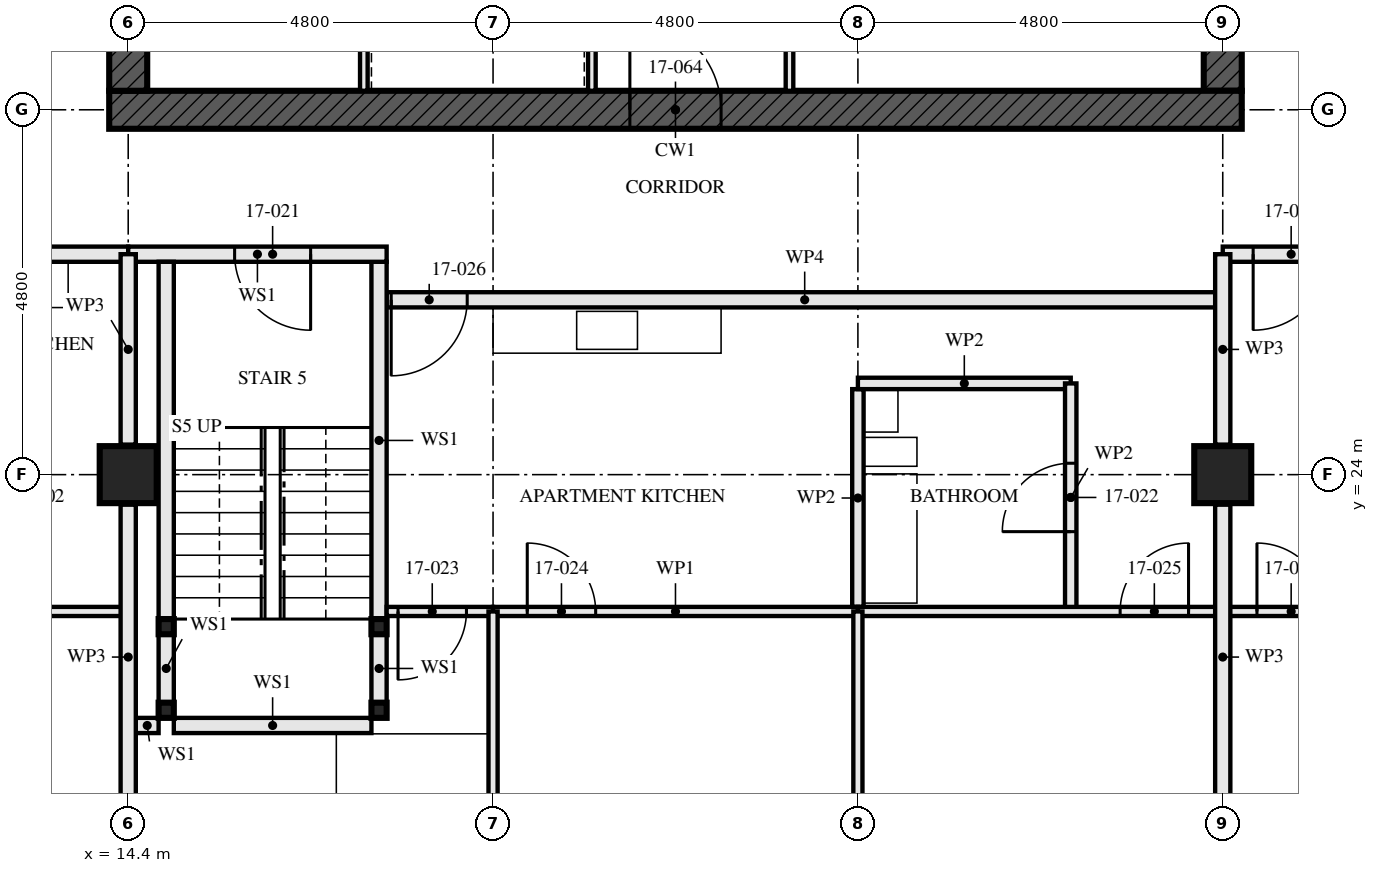
"""IFC4 building model, lengths in metres.
Left out: names, types, materials, properties, quantities, classifications, styles, units other than length and angle.
Written with IfcOpenShell. Run it as: python <this file> out.ifc"""

import sys

from ifc_helpers import new_model, si_unit, direction, frame, frame_2d, origin, origin_2d, place, context, subcontext, project, spatial, rectangle, hollow_rectangle, extrude, element, fill, save


model = new_model("IFC4")
c1 = context("Model", 3, precision=1e-05, world=origin(), true_north=direction((0.0, 1.0)))
c2 = subcontext(c1, "Body", "Model", "MODEL_VIEW")
j1 = project(units=[si_unit("LENGTHUNIT", "METRE"), si_unit("PLANEANGLEUNIT", "RADIAN")], contexts=[c1])
p1 = place(None, origin())
s1 = spatial("IfcSite", under=j1, at=p1, CompositionType="ELEMENT")
p2 = place(p1, origin())
s2 = spatial("IfcBuilding", under=s1, at=p2, CompositionType="ELEMENT")
p3 = place(p2, frame((0.0, 0.0, 65.5)))
s3 = spatial("IfcBuildingStorey", under=s2, at=p3, CompositionType="ELEMENT", Elevation=65.5)
for number, where, z_axis, x_axis in (
    (1, (14.4, 24.0, 0.0), (0.0, 0.0, 1.0), (1.0, 0.0, 0.0)),
    (2, (28.8, 24.0, 0.0), (0.0, 0.0, 1.0), (1.0, 0.0, 0.0)),
):
    element("IfcColumn", number, at=place(p3, frame(where, z_axis=z_axis, x_axis=x_axis)), inside=s3, PredefinedType="COLUMN", context=c2, shape_type="SweptSolid", body=[
        extrude(hollow_rectangle(XDim=0.75, YDim=0.75, WallThickness=0.08, at=origin_2d()), origin(), (0.0, 0.0, 1.0), 3.5),
    ])
p4 = place(p3, frame((14.15, 28.8, -0.17), z_axis=(0.0, 0.0, 1.0), x_axis=(1.0, 0.0, 0.0)))
e3 = element("IfcWall", 3, at=p4, inside=s3, PredefinedType="SHEAR", context=c2, shape_type="SweptSolid", body=[
    extrude(rectangle(XDim=14.9, YDim=0.5, at=frame_2d((7.45, 0.0))), origin(), (0.0, 0.0, 1.0), 3.5),
])
p5 = place(p4, frame((6.85, 0.0, 0.17)))
e4 = element("IfcOpeningElement", 4, at=p5, cuts=e3, PredefinedType="OPENING", context=c2, shape_type="SweptSolid", body=[
    extrude(rectangle(XDim=1.2, YDim=2.1, at=frame_2d((0.6, 1.05))), frame((0.0, 0.26, 0.0), z_axis=(0.0, -1.0, 0.0), x_axis=(1.0, 0.0, 0.0)), (0.0, 0.0, 1.0), 0.521),
])
p6 = place(p3, frame((14.4, 42.95, -0.17), z_axis=(0.0, 0.0, 1.0), x_axis=(0.0, -1.0, 0.0)))
e5 = element("IfcWall", 5, at=p6, inside=s3, PredefinedType="SHEAR", context=c2, shape_type="SweptSolid", body=[
    extrude(rectangle(XDim=13.9, YDim=0.5, at=frame_2d((6.95, 0.0))), origin(), (0.0, 0.0, 1.0), 3.5),
])
p7 = place(p6, frame((6.35, 0.0, 0.17)))
e6 = element("IfcOpeningElement", 6, at=p7, cuts=e5, PredefinedType="OPENING", context=c2, shape_type="SweptSolid", body=[
    extrude(rectangle(XDim=1.2, YDim=2.1, at=frame_2d((0.6, 1.05))), frame((0.0, 0.26, 0.0), z_axis=(0.0, -1.0, 0.0), x_axis=(1.0, 0.0, 0.0)), (0.0, 0.0, 1.0), 0.521),
])
p8 = place(p3, frame((28.8, 29.05, -0.17), z_axis=(0.0, 0.0, 1.0), x_axis=(0.0, 1.0, 0.0)))
e7 = element("IfcWall", 7, at=p8, inside=s3, PredefinedType="SHEAR", context=c2, shape_type="SweptSolid", body=[
    extrude(rectangle(XDim=13.9, YDim=0.5, at=frame_2d((6.95, 0.0))), origin(), (0.0, 0.0, 1.0), 3.5),
])
p9 = place(p8, frame((6.35, 0.0, 0.17)))
e8 = element("IfcOpeningElement", 8, at=p9, cuts=e7, PredefinedType="OPENING", context=c2, shape_type="SweptSolid", body=[
    extrude(rectangle(XDim=1.2, YDim=2.1, at=frame_2d((0.6, 1.05))), frame((0.0, 0.26, 0.0), z_axis=(0.0, -1.0, 0.0), x_axis=(1.0, 0.0, 0.0)), (0.0, 0.0, 1.0), 0.521),
])
for number, where, z_axis, x_axis in (
    (9, (14.9, 20.9, 0.0), (0.0, 0.0, 1.0), (1.0, 0.0, 0.0)),
    (10, (17.7, 20.9, 0.0), (0.0, 0.0, 1.0), (1.0, 0.0, 0.0)),
    (11, (14.9, 22.0, 0.0), (0.0, 0.0, 1.0), (1.0, 0.0, 0.0)),
    (12, (17.7, 22.0, 0.0), (0.0, 0.0, 1.0), (1.0, 0.0, 0.0)),
):
    element("IfcColumn", number, at=place(p3, frame(where, z_axis=z_axis, x_axis=x_axis)), inside=s3, PredefinedType="COLUMN", context=c2, shape_type="SweptSolid", body=[
        extrude(hollow_rectangle(XDim=0.2, YDim=0.2, WallThickness=0.008, at=origin_2d()), origin(), (0.0, 0.0, 1.0), 3.33),
    ])
p10 = place(p3, frame((9.6, 22.2, 0.0), z_axis=(0.0, 0.0, 1.0), x_axis=(1.0, 0.0, 0.0)))
e13 = element("IfcWall", 13, at=p10, inside=s3, PredefinedType="PARTITIONING", context=c2, shape_type="SweptSolid", body=[
    extrude(rectangle(XDim=4.8, YDim=0.12, at=frame_2d((2.4, 0.0))), origin(), (0.0, 0.0, 1.0), 3.33),
])
p11 = place(p3, frame((4.8, 26.9, 0.0), z_axis=(0.0, 0.0, 1.0), x_axis=(1.0, 0.0, 0.0)))
e14 = element("IfcWall", 14, at=p11, inside=s3, PredefinedType="PARTITIONING", context=c2, shape_type="SweptSolid", body=[
    extrude(rectangle(XDim=9.6, YDim=0.2, at=frame_2d((4.8, 0.0))), origin(), (0.0, 0.0, 1.0), 3.33),
])
p12 = place(p11, frame((0.4, 0.0, 0.0)))
e15 = element("IfcOpeningElement", 15, at=p12, cuts=e14, PredefinedType="OPENING", context=c2, shape_type="SweptSolid", body=[
    extrude(rectangle(XDim=1.0, YDim=2.1, at=frame_2d((0.5, 1.05))), frame((0.0, 0.111, 0.0), z_axis=(0.0, -1.0, 0.0), x_axis=(1.0, 0.0, 0.0)), (0.0, 0.0, 1.0), 0.221),
])
p13 = place(p3, frame((14.9, 21.0, 0.0), z_axis=(0.0, 0.0, 1.0), x_axis=(0.0, 1.0, 0.0)))
e16 = element("IfcWall", 16, at=p13, inside=s3, PredefinedType="SOLIDWALL", context=c2, shape_type="SweptSolid", body=[
    extrude(rectangle(XDim=0.9, YDim=0.2, at=frame_2d((0.45, 0.0))), origin(), (0.0, 0.0, 1.0), 2.99),
])
p14 = place(p3, frame((14.9, 22.1, 0.0), z_axis=(0.0, 0.0, 1.0), x_axis=(0.0, 1.0, 0.0)))
e17 = element("IfcWall", 17, at=p14, inside=s3, PredefinedType="SOLIDWALL", context=c2, shape_type="SweptSolid", body=[
    extrude(rectangle(XDim=4.7, YDim=0.2, at=frame_2d((2.35, 0.0))), origin(), (0.0, 0.0, 1.0), 2.99),
])
p15 = place(p3, frame((17.7, 21.0, 0.0), z_axis=(0.0, 0.0, 1.0), x_axis=(0.0, 1.0, 0.0)))
e18 = element("IfcWall", 18, at=p15, inside=s3, PredefinedType="SOLIDWALL", context=c2, shape_type="SweptSolid", body=[
    extrude(rectangle(XDim=0.9, YDim=0.2, at=frame_2d((0.45, 0.0))), origin(), (0.0, 0.0, 1.0), 2.99),
])
p16 = place(p3, frame((17.7, 22.1, 0.0), z_axis=(0.0, 0.0, 1.0), x_axis=(0.0, 1.0, 0.0)))
e19 = element("IfcWall", 19, at=p16, inside=s3, PredefinedType="SOLIDWALL", context=c2, shape_type="SweptSolid", body=[
    extrude(rectangle(XDim=4.7, YDim=0.2, at=frame_2d((2.35, 0.0))), origin(), (0.0, 0.0, 1.0), 2.99),
])
p17 = place(p3, frame((14.5, 20.7, 0.0), z_axis=(0.0, 0.0, 1.0), x_axis=(1.0, 0.0, 0.0)))
e20 = element("IfcWall", 20, at=p17, inside=s3, PredefinedType="SOLIDWALL", context=c2, shape_type="SweptSolid", body=[
    extrude(rectangle(XDim=0.3, YDim=0.2, at=frame_2d((0.15, 0.0))), origin(), (0.0, 0.0, 1.0), 3.33),
])
p18 = place(p3, frame((15.0, 20.7, 0.0), z_axis=(0.0, 0.0, 1.0), x_axis=(1.0, 0.0, 0.0)))
e21 = element("IfcWall", 21, at=p18, inside=s3, PredefinedType="SOLIDWALL", context=c2, shape_type="SweptSolid", body=[
    extrude(rectangle(XDim=2.6, YDim=0.2, at=frame_2d((1.3, 0.0))), origin(), (0.0, 0.0, 1.0), 3.33),
])
p19 = place(p3, frame((14.4, 26.9, 0.0), z_axis=(0.0, 0.0, 1.0), x_axis=(1.0, 0.0, 0.0)))
e22 = element("IfcWall", 22, at=p19, inside=s3, PredefinedType="SOLIDWALL", context=c2, shape_type="SweptSolid", body=[
    extrude(rectangle(XDim=3.4, YDim=0.2, at=frame_2d((1.7, 0.0))), origin(), (0.0, 0.0, 1.0), 3.33),
])
p20 = place(p19, frame((1.4, 0.0, 0.0)))
e23 = element("IfcOpeningElement", 23, at=p20, cuts=e22, PredefinedType="OPENING", context=c2, shape_type="SweptSolid", body=[
    extrude(rectangle(XDim=1.0, YDim=2.1, at=frame_2d((0.5, 1.05))), frame((0.0, 0.111, 0.0), z_axis=(0.0, -1.0, 0.0), x_axis=(1.0, 0.0, 0.0)), (0.0, 0.0, 1.0), 0.221),
])
p21 = place(p3, frame((26.8, 22.2, 0.0), z_axis=(0.0, 0.0, 1.0), x_axis=(0.0, 1.0, 0.0)))
e24 = element("IfcWall", 24, at=p21, inside=s3, PredefinedType="PARTITIONING", context=c2, shape_type="SweptSolid", body=[
    extrude(rectangle(XDim=3.0, YDim=0.15, at=frame_2d((1.5, 0.0))), origin(), (0.0, 0.0, 1.0), 2.55),
])
p22 = place(p21, frame((1.05, 0.0, 0.0)))
e25 = element("IfcOpeningElement", 25, at=p22, cuts=e24, PredefinedType="OPENING", context=c2, shape_type="SweptSolid", body=[
    extrude(rectangle(XDim=0.9, YDim=2.1, at=frame_2d((0.45, 1.05))), frame((0.0, 0.085, 0.0), z_axis=(0.0, -1.0, 0.0), x_axis=(1.0, 0.0, 0.0)), (0.0, 0.0, 1.0), 0.171),
])
p23 = place(p3, frame((24.0, 25.2, 0.0), z_axis=(0.0, 0.0, 1.0), x_axis=(1.0, 0.0, 0.0)))
e26 = element("IfcWall", 26, at=p23, inside=s3, PredefinedType="PARTITIONING", context=c2, shape_type="SweptSolid", body=[
    extrude(rectangle(XDim=2.8, YDim=0.15, at=frame_2d((1.4, 0.0))), origin(), (0.0, 0.0, 1.0), 3.33),
])
p24 = place(p3, frame((17.8, 22.2, 0.0), z_axis=(0.0, 0.0, 1.0), x_axis=(1.0, 0.0, 0.0)))
e27 = element("IfcWall", 27, at=p24, inside=s3, PredefinedType="PARTITIONING", context=c2, shape_type="SweptSolid", body=[
    extrude(rectangle(XDim=1.4, YDim=0.12, at=frame_2d((0.7, 0.0))), origin(), (0.0, 0.0, 1.0), 3.33),
])
p25 = place(p24, frame((0.15, 0.0, 0.0)))
e28 = element("IfcOpeningElement", 28, at=p25, cuts=e27, PredefinedType="OPENING", context=c2, shape_type="SweptSolid", body=[
    extrude(rectangle(XDim=0.9, YDim=2.1, at=frame_2d((0.45, 1.05))), frame((0.0, 0.071, 0.0), z_axis=(0.0, -1.0, 0.0), x_axis=(1.0, 0.0, 0.0)), (0.0, 0.0, 1.0), 0.141),
])
p26 = place(p3, frame((19.2, 22.2, 0.0), z_axis=(0.0, 0.0, 1.0), x_axis=(1.0, 0.0, 0.0)))
e29 = element("IfcWall", 29, at=p26, inside=s3, PredefinedType="PARTITIONING", context=c2, shape_type="SweptSolid", body=[
    extrude(rectangle(XDim=4.8, YDim=0.12, at=frame_2d((2.4, 0.0))), origin(), (0.0, 0.0, 1.0), 3.33),
])
p27 = place(p26, frame((0.45, 0.0, 0.0)))
e30 = element("IfcOpeningElement", 30, at=p27, cuts=e29, PredefinedType="OPENING", context=c2, shape_type="SweptSolid", body=[
    extrude(rectangle(XDim=0.9, YDim=2.1, at=frame_2d((0.45, 1.05))), frame((0.0, 0.071, 0.0), z_axis=(0.0, -1.0, 0.0), x_axis=(1.0, 0.0, 0.0)), (0.0, 0.0, 1.0), 0.141),
])
p28 = place(p3, frame((24.0, 22.2, 0.0), z_axis=(0.0, 0.0, 1.0), x_axis=(1.0, 0.0, 0.0)))
e31 = element("IfcWall", 31, at=p28, inside=s3, PredefinedType="PARTITIONING", context=c2, shape_type="SweptSolid", body=[
    extrude(rectangle(XDim=4.8, YDim=0.12, at=frame_2d((2.4, 0.0))), origin(), (0.0, 0.0, 1.0), 3.33),
])
p29 = place(p28, frame((3.45, 0.0, 0.0)))
e32 = element("IfcOpeningElement", 32, at=p29, cuts=e31, PredefinedType="OPENING", context=c2, shape_type="SweptSolid", body=[
    extrude(rectangle(XDim=0.9, YDim=2.1, at=frame_2d((0.45, 1.05))), frame((0.0, 0.071, 0.0), z_axis=(0.0, -1.0, 0.0), x_axis=(1.0, 0.0, 0.0)), (0.0, 0.0, 1.0), 0.141),
])
for number, where, z_axis, x_axis in (
    (33, (19.2, 14.72, 0.0), (0.0, 0.0, 1.0), (0.0, 1.0, 0.0)),
    (34, (24.0, 14.72, 0.0), (0.0, 0.0, 1.0), (0.0, 1.0, 0.0)),
):
    element("IfcWall", number, at=place(p3, frame(where, z_axis=z_axis, x_axis=x_axis)), inside=s3, PredefinedType="PARTITIONING", context=c2, shape_type="SweptSolid", body=[
        extrude(rectangle(XDim=7.48, YDim=0.12, at=frame_2d((3.74, 0.0))), origin(), (0.0, 0.0, 1.0), 2.55),
    ])
p30 = place(p3, frame((17.8, 26.3, 0.0), z_axis=(0.0, 0.0, 1.0), x_axis=(1.0, 0.0, 0.0)))
e35 = element("IfcWall", 35, at=p30, inside=s3, PredefinedType="PARTITIONING", context=c2, shape_type="SweptSolid", body=[
    extrude(rectangle(XDim=11.0, YDim=0.2, at=frame_2d((5.5, 0.0))), origin(), (0.0, 0.0, 1.0), 2.55),
])
p31 = place(p30, frame((0.06, 0.0, 0.0)))
e36 = element("IfcOpeningElement", 36, at=p31, cuts=e35, PredefinedType="OPENING", context=c2, shape_type="SweptSolid", body=[
    extrude(rectangle(XDim=1.0, YDim=2.1, at=frame_2d((0.5, 1.05))), frame((0.0, 0.111, 0.0), z_axis=(0.0, -1.0, 0.0), x_axis=(1.0, 0.0, 0.0)), (0.0, 0.0, 1.0), 0.221),
])
p32 = place(p3, frame((28.8, 22.2, 0.0), z_axis=(0.0, 0.0, 1.0), x_axis=(1.0, 0.0, 0.0)))
e37 = element("IfcWall", 37, at=p32, inside=s3, PredefinedType="PARTITIONING", context=c2, shape_type="SweptSolid", body=[
    extrude(rectangle(XDim=4.8, YDim=0.12, at=frame_2d((2.4, 0.0))), origin(), (0.0, 0.0, 1.0), 3.33),
])
p33 = place(p32, frame((0.45, 0.0, 0.0)))
e38 = element("IfcOpeningElement", 38, at=p33, cuts=e37, PredefinedType="OPENING", context=c2, shape_type="SweptSolid", body=[
    extrude(rectangle(XDim=0.9, YDim=2.1, at=frame_2d((0.45, 1.05))), frame((0.0, 0.071, 0.0), z_axis=(0.0, -1.0, 0.0), x_axis=(1.0, 0.0, 0.0)), (0.0, 0.0, 1.0), 0.141),
])
p34 = place(p3, frame((28.8, 26.9, 0.0), z_axis=(0.0, 0.0, 1.0), x_axis=(1.0, 0.0, 0.0)))
e39 = element("IfcWall", 39, at=p34, inside=s3, PredefinedType="PARTITIONING", context=c2, shape_type="SweptSolid", body=[
    extrude(rectangle(XDim=9.6, YDim=0.2, at=frame_2d((4.8, 0.0))), origin(), (0.0, 0.0, 1.0), 3.33),
])
p35 = place(p34, frame((0.4, 0.0, 0.0)))
e40 = element("IfcOpeningElement", 40, at=p35, cuts=e39, PredefinedType="OPENING", context=c2, shape_type="SweptSolid", body=[
    extrude(rectangle(XDim=1.0, YDim=2.1, at=frame_2d((0.5, 1.05))), frame((0.0, 0.111, 0.0), z_axis=(0.0, -1.0, 0.0), x_axis=(1.0, 0.0, 0.0)), (0.0, 0.0, 1.0), 0.221),
])
p36 = place(p3, frame((20.5, 29.05, 0.0), z_axis=(0.0, 0.0, 1.0), x_axis=(0.0, 1.0, 0.0)))
e41 = element("IfcWall", 41, at=p36, inside=s3, PredefinedType="SOLIDWALL", context=c2, shape_type="SweptSolid", body=[
    extrude(rectangle(XDim=5.8, YDim=0.1, at=frame_2d((2.9, 0.0))), origin(), (0.0, 0.0, 1.0), 3.33),
])
p37 = place(p36, frame((0.8, 0.0, 0.0)))
e42 = element("IfcOpeningElement", 42, at=p37, cuts=e41, PredefinedType="OPENING", context=c2, shape_type="SweptSolid", body=[
    extrude(rectangle(XDim=1.1, YDim=2.3, at=frame_2d((0.55, 1.15))), frame((0.0, 0.061, 0.0), z_axis=(0.0, -1.0, 0.0), x_axis=(1.0, 0.0, 0.0)), (0.0, 0.0, 1.0), 0.121),
])
p38 = place(p36, frame((3.775, 0.0, 0.0)))
e43 = element("IfcOpeningElement", 43, at=p38, cuts=e41, PredefinedType="OPENING", context=c2, shape_type="SweptSolid", body=[
    extrude(rectangle(XDim=1.1, YDim=2.3, at=frame_2d((0.55, 1.15))), frame((0.0, 0.061, 0.0), z_axis=(0.0, -1.0, 0.0), x_axis=(1.0, 0.0, 0.0)), (0.0, 0.0, 1.0), 0.121),
])
p39 = place(p3, frame((23.1, 29.05, 0.0), z_axis=(0.0, 0.0, 1.0), x_axis=(0.0, 1.0, 0.0)))
e44 = element("IfcWall", 44, at=p39, inside=s3, PredefinedType="SOLIDWALL", context=c2, shape_type="SweptSolid", body=[
    extrude(rectangle(XDim=5.8, YDim=0.1, at=frame_2d((2.9, 0.0))), origin(), (0.0, 0.0, 1.0), 3.33),
])
p40 = place(p39, frame((1.0, 0.0, 0.0)))
e45 = element("IfcOpeningElement", 45, at=p40, cuts=e44, PredefinedType="OPENING", context=c2, shape_type="SweptSolid", body=[
    extrude(rectangle(XDim=0.7, YDim=2.1, at=frame_2d((0.35, 1.05))), frame((0.0, 0.061, 0.0), z_axis=(0.0, -1.0, 0.0), x_axis=(1.0, 0.0, 0.0)), (0.0, 0.0, 1.0), 0.121),
])
p41 = place(p3, frame((17.5, 29.05, 0.0), z_axis=(0.0, 0.0, 1.0), x_axis=(0.0, 1.0, 0.0)))
e46 = element("IfcWall", 46, at=p41, inside=s3, PredefinedType="SOLIDWALL", context=c2, shape_type="SweptSolid", body=[
    extrude(rectangle(XDim=5.8, YDim=0.1, at=frame_2d((2.9, 0.0))), origin(), (0.0, 0.0, 1.0), 3.33),
])
p42 = place(p3, frame((14.4, 19.595, 0.0), z_axis=(0.0, 0.0, 1.0), x_axis=(0.0, 1.0, 0.0)))
e47 = element("IfcWall", 47, at=p42, inside=s3, PredefinedType="PARTITIONING", context=c2, shape_type="SweptSolid", body=[
    extrude(rectangle(XDim=4.01, YDim=0.2, at=frame_2d((2.005, 0.0))), origin(), (0.0, 0.0, 1.0), 2.32),
])
p43 = place(p3, frame((14.4, 24.395, 0.0), z_axis=(0.0, 0.0, 1.0), x_axis=(0.0, 1.0, 0.0)))
e48 = element("IfcWall", 48, at=p43, inside=s3, PredefinedType="PARTITIONING", context=c2, shape_type="SweptSolid", body=[
    extrude(rectangle(XDim=2.505, YDim=0.2, at=frame_2d((1.252, 0.0))), origin(), (0.0, 0.0, 1.0), 2.32),
])
p44 = place(p3, frame((28.8, 19.595, 0.0), z_axis=(0.0, 0.0, 1.0), x_axis=(0.0, 1.0, 0.0)))
e49 = element("IfcWall", 49, at=p44, inside=s3, PredefinedType="PARTITIONING", context=c2, shape_type="SweptSolid", body=[
    extrude(rectangle(XDim=4.01, YDim=0.2, at=frame_2d((2.005, 0.0))), origin(), (0.0, 0.0, 1.0), 2.32),
])
p45 = place(p3, frame((28.8, 24.395, 0.0), z_axis=(0.0, 0.0, 1.0), x_axis=(0.0, 1.0, 0.0)))
e50 = element("IfcWall", 50, at=p45, inside=s3, PredefinedType="PARTITIONING", context=c2, shape_type="SweptSolid", body=[
    extrude(rectangle(XDim=2.505, YDim=0.2, at=frame_2d((1.252, 0.0))), origin(), (0.0, 0.0, 1.0), 2.32),
])
p46 = place(p3, frame((24.0, 22.26, 0.0), z_axis=(0.0, 0.0, 1.0), x_axis=(0.0, 1.0, 0.0)))
e51 = element("IfcWall", 51, at=p46, inside=s3, PredefinedType="PARTITIONING", context=c2, shape_type="SweptSolid", body=[
    extrude(rectangle(XDim=2.865, YDim=0.15, at=frame_2d((1.433, 0.0))), origin(), (0.0, 0.0, 1.0), 2.55),
])
p47 = place(p20, frame((1.0, 0.0, 0.0), z_axis=(0.0, 0.0, 1.0), x_axis=(-1.0, 0.0, 0.0)))
e52 = element("IfcDoor", 52, at=p47, inside=s3, OperationType="SINGLE_SWING_RIGHT", PredefinedType="DOOR", context=c2, shape_type="SweptSolid", body=[
    extrude(rectangle(XDim=1.0, YDim=2.1, at=frame_2d((0.5, 1.05))), frame((0.0, 0.032, 0.0), z_axis=(0.0, -1.0, 0.0), x_axis=(1.0, 0.0, 0.0)), (0.0, 0.0, 1.0), 0.064),
])
fill(e23, e52)
p48 = place(p22, origin())
e53 = element("IfcDoor", 53, at=p48, inside=s3, OperationType="SINGLE_SWING_RIGHT", PredefinedType="DOOR", context=c2, shape_type="SweptSolid", body=[
    extrude(rectangle(XDim=0.9, YDim=2.1, at=frame_2d((0.45, 1.05))), frame((0.0, 0.022, 0.0), z_axis=(0.0, -1.0, 0.0), x_axis=(1.0, 0.0, 0.0)), (0.0, 0.0, 1.0), 0.044),
])
fill(e25, e53)
p49 = place(p25, frame((0.9, 0.0, 0.0), z_axis=(0.0, 0.0, 1.0), x_axis=(-1.0, 0.0, 0.0)))
e54 = element("IfcDoor", 54, at=p49, inside=s3, OperationType="SINGLE_SWING_LEFT", PredefinedType="DOOR", context=c2, shape_type="SweptSolid", body=[
    extrude(rectangle(XDim=0.9, YDim=2.1, at=frame_2d((0.45, 1.05))), frame((0.0, 0.022, 0.0), z_axis=(0.0, -1.0, 0.0), x_axis=(1.0, 0.0, 0.0)), (0.0, 0.0, 1.0), 0.044),
])
fill(e28, e54)
p50 = place(p27, origin())
e55 = element("IfcDoor", 55, at=p50, inside=s3, OperationType="SINGLE_SWING_RIGHT", PredefinedType="DOOR", context=c2, shape_type="SweptSolid", body=[
    extrude(rectangle(XDim=0.9, YDim=2.1, at=frame_2d((0.45, 1.05))), frame((0.0, 0.022, 0.0), z_axis=(0.0, -1.0, 0.0), x_axis=(1.0, 0.0, 0.0)), (0.0, 0.0, 1.0), 0.044),
])
fill(e30, e55)
p51 = place(p29, origin())
e56 = element("IfcDoor", 56, at=p51, inside=s3, OperationType="SINGLE_SWING_LEFT", PredefinedType="DOOR", context=c2, shape_type="SweptSolid", body=[
    extrude(rectangle(XDim=0.9, YDim=2.1, at=frame_2d((0.45, 1.05))), frame((0.0, 0.022, 0.0), z_axis=(0.0, -1.0, 0.0), x_axis=(1.0, 0.0, 0.0)), (0.0, 0.0, 1.0), 0.044),
])
fill(e32, e56)
p52 = place(p31, frame((1.0, 0.0, 0.0), z_axis=(0.0, 0.0, 1.0), x_axis=(-1.0, 0.0, 0.0)))
e57 = element("IfcDoor", 57, at=p52, inside=s3, OperationType="SINGLE_SWING_LEFT", PredefinedType="DOOR", context=c2, shape_type="SweptSolid", body=[
    extrude(rectangle(XDim=1.0, YDim=2.1, at=frame_2d((0.5, 1.05))), frame((0.0, 0.027, 0.0), z_axis=(0.0, -1.0, 0.0), x_axis=(1.0, 0.0, 0.0)), (0.0, 0.0, 1.0), 0.054),
])
fill(e36, e57)
p53 = place(p33, origin())
e58 = element("IfcDoor", 58, at=p53, inside=s3, OperationType="SINGLE_SWING_RIGHT", PredefinedType="DOOR", context=c2, shape_type="SweptSolid", body=[
    extrude(rectangle(XDim=0.9, YDim=2.1, at=frame_2d((0.45, 1.05))), frame((0.0, 0.022, 0.0), z_axis=(0.0, -1.0, 0.0), x_axis=(1.0, 0.0, 0.0)), (0.0, 0.0, 1.0), 0.044),
])
fill(e38, e58)
p54 = place(p35, frame((1.0, 0.0, 0.0), z_axis=(0.0, 0.0, 1.0), x_axis=(-1.0, 0.0, 0.0)))
e59 = element("IfcDoor", 59, at=p54, inside=s3, OperationType="SINGLE_SWING_LEFT", PredefinedType="DOOR", context=c2, shape_type="SweptSolid", body=[
    extrude(rectangle(XDim=1.0, YDim=2.1, at=frame_2d((0.5, 1.05))), frame((0.0, 0.027, 0.0), z_axis=(0.0, -1.0, 0.0), x_axis=(1.0, 0.0, 0.0)), (0.0, 0.0, 1.0), 0.054),
])
fill(e40, e59)
p55 = place(p5, origin())
e60 = element("IfcDoor", 60, at=p55, inside=s3, OperationType="SINGLE_SWING_LEFT", PredefinedType="DOOR", context=c2, shape_type="SweptSolid", body=[
    extrude(rectangle(XDim=1.2, YDim=2.1, at=frame_2d((0.6, 1.05))), frame((0.0, 0.027, 0.0), z_axis=(0.0, -1.0, 0.0), x_axis=(1.0, 0.0, 0.0)), (0.0, 0.0, 1.0), 0.054),
])
fill(e4, e60)
save(model, sys.argv[1])
